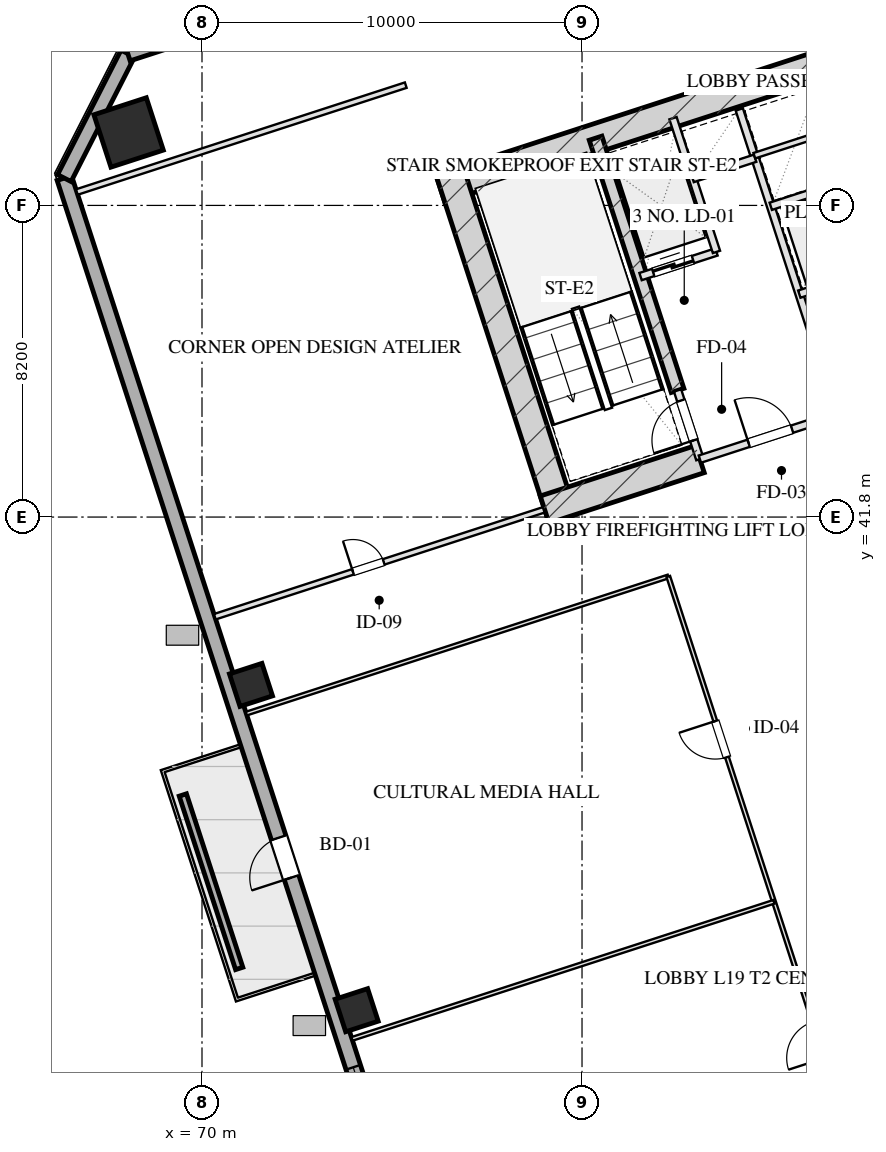
"""IFC4 building model, lengths in metres.
Left out: names, types, materials, properties, quantities, classifications, styles, units other than length and angle.
Written with IfcOpenShell. Run it as: python <this file> out.ifc"""

import sys

from ifc_helpers import new_model, si_unit, direction, frame, frame_2d, origin, origin_2d, place, context, subcontext, project, spatial, rectangle, hollow_rectangle, extrude, element, fill, save


model = new_model("IFC4")
c1 = context("Model", 3, precision=1e-05, world=origin(), true_north=direction((0.0, 1.0)))
c2 = subcontext(c1, "Body", "Model", "MODEL_VIEW")
j1 = project(units=[si_unit("LENGTHUNIT", "METRE"), si_unit("PLANEANGLEUNIT", "RADIAN")], contexts=[c1])
p1 = place(None, origin())
s1 = spatial("IfcSite", under=j1, at=p1, CompositionType="ELEMENT")
p2 = place(p1, origin())
s2 = spatial("IfcBuilding", under=s1, at=p2, CompositionType="ELEMENT")
p3 = place(p2, frame((0.0, 0.0, 78.2)))
s3 = spatial("IfcBuildingStorey", under=s2, at=p3, CompositionType="ELEMENT", Elevation=78.2)
p4 = place(p3, frame((76.272, 50.443, 0.0), z_axis=(0.0, 0.0, 1.0), x_axis=(0.951056072937, 0.309018358888, 0.0)))
e1 = element("IfcWall", 1, at=p4, inside=s3, PredefinedType="SHEAR", context=c2, shape_type="SweptSolid", body=[
    extrude(rectangle(XDim=16.55, YDim=0.75, at=frame_2d((8.275, 0.0))), origin(), (0.0, 0.0, 1.0), 3.45),
])
p5 = place(p3, frame((79.489, 41.756, 0.0), z_axis=(0.0, 0.0, 1.0), x_axis=(-0.309016134813, 0.951056795583, 0.0)))
e2 = element("IfcWall", 2, at=p5, inside=s3, PredefinedType="SHEAR", context=c2, shape_type="SweptSolid", body=[
    extrude(rectangle(XDim=9.63, YDim=0.75, at=frame_2d((4.815, 0.0))), origin(), (0.0, 0.0, 1.0), 3.45),
])
p6 = place(p3, frame((82.514, 45.131, 0.0), z_axis=(0.0, 0.0, 1.0), x_axis=(-0.308988790936, 0.951065679686, 0.0)))
e3 = element("IfcWall", 3, at=p6, inside=s3, PredefinedType="SHEAR", context=c2, shape_type="SweptSolid", body=[
    extrude(rectangle(XDim=6.98, YDim=0.35, at=frame_2d((3.49, 0.0))), origin(), (0.0, 0.0, 1.0), 3.45),
])
p7 = place(p3, frame((79.016, 41.997, 0.0), z_axis=(0.0, 0.0, 1.0), x_axis=(0.95106038264, 0.309005094736, 0.0)))
e4 = element("IfcWall", 4, at=p7, inside=s3, PredefinedType="SHEAR", context=c2, shape_type="SweptSolid", body=[
    extrude(rectangle(XDim=4.295, YDim=0.75, at=frame_2d((2.147, 0.0))), origin(), (0.0, 0.0, 1.0), 3.45),
])
p8 = place(p3, frame((68.069, 51.92, 0.0), z_axis=(0.0, 0.0, 1.0), x_axis=(0.951056516295, 0.309016994375, 0.0)))
e5 = element("IfcColumn", 5, at=p8, inside=s3, PredefinedType="COLUMN", context=c2, shape_type="SweptSolid", body=[
    extrude(hollow_rectangle(XDim=1.45, YDim=1.45, WallThickness=0.05, at=origin_2d()), origin(), (0.0, 0.0, 1.0), 3.451),
])
for number, where, z_axis, x_axis in (
    (6, (74.07, 28.824, 0.0), (0.0, 0.0, 1.0), (0.951, 0.309, 0.0)),
    (7, (71.289, 37.384, 0.0), (0.0, 0.0, 1.0), (0.951, 0.309, 0.0)),
):
    element("IfcColumn", number, at=place(p3, frame(where, z_axis=z_axis, x_axis=x_axis)), inside=s3, PredefinedType="COLUMN", context=c2, shape_type="SweptSolid", body=[
        extrude(hollow_rectangle(XDim=0.9, YDim=0.9, WallThickness=0.032, at=origin_2d()), origin(), (0.0, 0.0, 1.0), 3.451),
    ])
p9 = place(p3, frame((80.716, 6.59, 0.0), z_axis=(0.0, 0.0, 1.0), x_axis=(-0.309017542002, 0.95105633836, 0.0)))
e8 = element("IfcWall", 8, at=p9, inside=s3, PredefinedType="SOLIDWALL", context=c2, shape_type="SweptSolid", body=[
    extrude(rectangle(XDim=46.4, YDim=0.4, at=frame_2d((23.2, 0.0))), origin(), (0.0, 0.0, 1.0), 2.61),
])
p10 = place(p9, frame((15.6, 0.0, 0.75)))
e9 = element("IfcOpeningElement", 9, at=p10, cuts=e8, PredefinedType="OPENING", context=c2, shape_type="SweptSolid", body=[
    extrude(rectangle(XDim=2.4, YDim=1.46, at=frame_2d((1.2, 0.73))), frame((0.0, 0.21, 0.0), z_axis=(0.0, -1.0, 0.0), x_axis=(1.0, 0.0, 0.0)), (0.0, 0.0, 1.0), 0.42),
])
p11 = place(p9, frame((19.4, 0.0, 0.75)))
e10 = element("IfcOpeningElement", 10, at=p11, cuts=e8, PredefinedType="OPENING", context=c2, shape_type="SweptSolid", body=[
    extrude(rectangle(XDim=2.4, YDim=1.46, at=frame_2d((1.2, 0.73))), frame((0.0, 0.21, 0.0), z_axis=(0.0, -1.0, 0.0), x_axis=(1.0, 0.0, 0.0)), (0.0, 0.0, 1.0), 0.42),
])
p12 = place(p9, frame((27.05, 0.0, 0.0)))
e11 = element("IfcOpeningElement", 11, at=p12, cuts=e8, PredefinedType="OPENING", context=c2, shape_type="SweptSolid", body=[
    extrude(rectangle(XDim=1.1, YDim=2.15, at=frame_2d((0.55, 1.075))), frame((0.0, 0.21, 0.0), z_axis=(0.0, -1.0, 0.0), x_axis=(1.0, 0.0, 0.0)), (0.0, 0.0, 1.0), 0.42),
])
p13 = place(p3, frame((66.377, 50.719, 0.0), z_axis=(0.0, 0.0, 1.0), x_axis=(0.454026238093, 0.890988313685, 0.0)))
e12 = element("IfcWall", 12, at=p13, inside=s3, PredefinedType="SOLIDWALL", context=c2, shape_type="SweptSolid", body=[
    extrude(rectangle(XDim=3.677, YDim=0.4, at=frame_2d((1.838, 0.0))), origin(), (0.0, 0.0, 1.0), 2.61),
])
p14 = place(p3, frame((68.047, 53.995, 0.0), z_axis=(0.0, 0.0, 1.0), x_axis=(0.95105505922, 0.309021478754, 0.0)))
e13 = element("IfcWall", 13, at=p14, inside=s3, PredefinedType="SOLIDWALL", context=c2, shape_type="SweptSolid", body=[
    extrude(rectangle(XDim=29.4, YDim=0.4, at=frame_2d((14.7, 0.0))), origin(), (0.0, 0.0, 1.0), 2.61),
])
p15 = place(p3, frame((70.979, 29.923, 0.0), z_axis=(0.0, 0.0, 1.0), x_axis=(-0.308986014439, 0.951066581729, 0.0)))
e14 = element("IfcWall", 14, at=p15, inside=s3, PredefinedType="PARAPET", context=c2, shape_type="SweptSolid", body=[
    extrude(rectangle(XDim=4.8, YDim=0.2, at=frame_2d((2.4, 0.0))), origin(), (0.0, 0.0, 1.0), 0.75),
])
p16 = place(p3, frame((83.101, 43.324, 0.0), z_axis=(0.0, 0.0, 1.0), x_axis=(-0.309048298632, 0.951046344356, 0.0)))
e15 = element("IfcWall", 15, at=p16, inside=s3, PredefinedType="PARTITIONING", context=c2, shape_type="SweptSolid", body=[
    extrude(rectangle(XDim=1.9, YDim=0.2, at=frame_2d((0.95, 0.0))), origin(), (0.0, 0.0, 1.0), 3.175),
])
p17 = place(p16, frame((0.52, 0.0, 0.0)))
e16 = element("IfcOpeningElement", 16, at=p17, cuts=e15, PredefinedType="OPENING", context=c2, shape_type="SweptSolid", body=[
    extrude(rectangle(XDim=1.1, YDim=2.05, at=frame_2d((0.55, 1.025))), frame((0.0, 0.11, 0.0), z_axis=(0.0, -1.0, 0.0), x_axis=(1.0, 0.0, 0.0)), (0.0, 0.0, 1.0), 0.22),
])
p18 = place(p3, frame((86.743, 44.508, 0.0), z_axis=(0.0, 0.0, 1.0), x_axis=(-0.309016001439, 0.951056838919, 0.0)))
e17 = element("IfcWall", 17, at=p18, inside=s3, PredefinedType="PARTITIONING", context=c2, shape_type="SweptSolid", body=[
    extrude(rectangle(XDim=8.43, YDim=0.2, at=frame_2d((4.215, 0.0))), origin(), (0.0, 0.0, 1.0), 3.175),
])
p19 = place(p3, frame((83.101, 43.324, 0.0), z_axis=(0.0, 0.0, 1.0), x_axis=(0.951052804469, 0.309028417967, 0.0)))
e18 = element("IfcWall", 18, at=p19, inside=s3, PredefinedType="PARTITIONING", context=c2, shape_type="SweptSolid", body=[
    extrude(rectangle(XDim=3.83, YDim=0.2, at=frame_2d((1.915, 0.0))), origin(), (0.0, 0.0, 1.0), 3.175),
])
p20 = place(p19, frame((1.35, 0.0, 0.0)))
e19 = element("IfcOpeningElement", 19, at=p20, cuts=e18, PredefinedType="OPENING", context=c2, shape_type="SweptSolid", body=[
    extrude(rectangle(XDim=1.2, YDim=2.05, at=frame_2d((0.6, 1.025))), frame((0.0, 0.11, 0.0), z_axis=(0.0, -1.0, 0.0), x_axis=(1.0, 0.0, 0.0)), (0.0, 0.0, 1.0), 0.22),
])
p21 = place(p3, frame((81.54, 48.127, 0.0), z_axis=(0.0, 0.0, 1.0), x_axis=(0.951062257173, 0.308999325213, 0.0)))
e20 = element("IfcWall", 20, at=p21, inside=s3, PredefinedType="PARTITIONING", context=c2, shape_type="SweptSolid", body=[
    extrude(rectangle(XDim=2.1, YDim=0.2, at=frame_2d((1.05, 0.0))), origin(), (0.0, 0.0, 1.0), 3.175),
])
p22 = place(p21, frame((0.35, 0.0, 0.0)))
e21 = element("IfcOpeningElement", 21, at=p22, cuts=e20, PredefinedType="OPENING", context=c2, shape_type="SweptSolid", body=[
    extrude(rectangle(XDim=1.1, YDim=2.05, at=frame_2d((0.55, 1.025))), frame((0.0, 0.11, 0.0), z_axis=(0.0, -1.0, 0.0), x_axis=(1.0, 0.0, 0.0)), (0.0, 0.0, 1.0), 0.22),
])
p23 = place(p3, frame((83.538, 48.776, 0.0), z_axis=(0.0, 0.0, 1.0), x_axis=(-0.3089935693, 0.951064127245, 0.0)))
e22 = element("IfcWall", 22, at=p23, inside=s3, PredefinedType="PARTITIONING", context=c2, shape_type="SweptSolid", body=[
    extrude(rectangle(XDim=3.7, YDim=0.2, at=frame_2d((1.85, 0.0))), origin(), (0.0, 0.0, 1.0), 3.175),
])
p24 = place(p3, frame((82.91, 50.707, 0.0), z_axis=(0.0, 0.0, 1.0), x_axis=(0.951041328149, 0.309063734775, 0.0)))
e23 = element("IfcWall", 23, at=p24, inside=s3, PredefinedType="PARTITIONING", context=c2, shape_type="SweptSolid", body=[
    extrude(rectangle(XDim=1.73, YDim=0.2, at=frame_2d((0.865, 0.0))), origin(), (0.0, 0.0, 1.0), 3.175),
])
p25 = place(p3, frame((85.718, 47.666, 0.0), z_axis=(0.0, 0.0, 1.0), x_axis=(0.951058531764, 0.30901079133, 0.0)))
e24 = element("IfcWall", 24, at=p25, inside=s3, PredefinedType="PARTITIONING", context=c2, shape_type="SweptSolid", body=[
    extrude(rectangle(XDim=4.4, YDim=0.2, at=frame_2d((2.2, 0.0))), origin(), (0.0, 0.0, 1.0), 3.175),
])
p26 = place(p25, frame((0.45, 0.0, 0.0)))
e25 = element("IfcOpeningElement", 25, at=p26, cuts=e24, PredefinedType="OPENING", context=c2, shape_type="SweptSolid", body=[
    extrude(rectangle(XDim=1.1, YDim=2.05, at=frame_2d((0.55, 1.025))), frame((0.0, 0.11, 0.0), z_axis=(0.0, -1.0, 0.0), x_axis=(1.0, 0.0, 0.0)), (0.0, 0.0, 1.0), 0.22),
])
p27 = place(p25, frame((2.55, 0.0, 0.0)))
e26 = element("IfcOpeningElement", 26, at=p27, cuts=e24, PredefinedType="OPENING", context=c2, shape_type="SweptSolid", body=[
    extrude(rectangle(XDim=1.1, YDim=2.05, at=frame_2d((0.55, 1.025))), frame((0.0, 0.11, 0.0), z_axis=(0.0, -1.0, 0.0), x_axis=(1.0, 0.0, 0.0)), (0.0, 0.0, 1.0), 0.22),
])
p28 = place(p3, frame((84.967, 49.977, 0.0), z_axis=(0.0, 0.0, 1.0), x_axis=(0.951063829732, 0.308994485023, 0.0)))
e27 = element("IfcWall", 27, at=p28, inside=s3, PredefinedType="PARTITIONING", context=c2, shape_type="SweptSolid", body=[
    extrude(rectangle(XDim=4.4, YDim=0.2, at=frame_2d((2.2, 0.0))), origin(), (0.0, 0.0, 1.0), 3.175),
])
p29 = place(p3, frame((84.534, 51.308, 0.0), z_axis=(0.0, 0.0, 1.0), x_axis=(0.951075093106, 0.308959814982, 0.0)))
e28 = element("IfcWall", 28, at=p29, inside=s3, PredefinedType="PARTITIONING", context=c2, shape_type="SweptSolid", body=[
    extrude(rectangle(XDim=2.23, YDim=0.15, at=frame_2d((1.115, 0.0))), origin(), (0.0, 0.0, 1.0), 3.175),
])
p30 = place(p3, frame((66.707, 50.352, 0.0), z_axis=(0.0, 0.0, 1.0), x_axis=(0.951057133767, 0.309015093986, 0.0)))
e29 = element("IfcWall", 29, at=p30, inside=s3, PredefinedType="PARTITIONING", context=c2, shape_type="SweptSolid", body=[
    extrude(rectangle(XDim=9.1, YDim=0.15, at=frame_2d((4.55, 0.0))), origin(), (0.0, 0.0, 1.0), 3.175),
])
p31 = place(p3, frame((70.338, 39.177, 0.0), z_axis=(0.0, 0.0, 1.0), x_axis=(0.951059695568, 0.309007209409, 0.0)))
e30 = element("IfcWall", 30, at=p31, inside=s3, PredefinedType="PARTITIONING", context=c2, shape_type="SweptSolid", body=[
    extrude(rectangle(XDim=9.1, YDim=0.15, at=frame_2d((4.55, 0.0))), origin(), (0.0, 0.0, 1.0), 3.175),
])
p32 = place(p31, frame((3.822, 0.0, 0.0)))
e31 = element("IfcOpeningElement", 31, at=p32, cuts=e30, PredefinedType="OPENING", context=c2, shape_type="SweptSolid", body=[
    extrude(rectangle(XDim=0.85, YDim=2.05, at=frame_2d((0.425, 1.025))), frame((0.0, 0.085, 0.0), z_axis=(0.0, -1.0, 0.0), x_axis=(1.0, 0.0, 0.0)), (0.0, 0.0, 1.0), 0.17),
])
p33 = place(p3, frame((71.166, 36.629, 0.0), z_axis=(0.0, 0.0, 1.0), x_axis=(0.951058653673, 0.309010416124, 0.0)))
e32 = element("IfcWall", 32, at=p33, inside=s3, PredefinedType="MOVABLE", context=c2, shape_type="SweptSolid", body=[
    extrude(rectangle(XDim=11.675, YDim=0.1, at=frame_2d((5.837, 0.0))), origin(), (0.0, 0.0, 1.0), 3.175),
])
p34 = place(p3, frame((87.412, 24.411, 0.0), z_axis=(0.0, 0.0, 1.0), x_axis=(-0.309022042254, 0.951054876125, 0.0)))
e33 = element("IfcWall", 33, at=p34, inside=s3, PredefinedType="MOVABLE", context=c2, shape_type="SweptSolid", body=[
    extrude(rectangle(XDim=16.64, YDim=0.1, at=frame_2d((8.32, 0.0))), origin(), (0.0, 0.0, 1.0), 3.175),
])
p35 = place(p34, frame((3.32, 0.0, 0.0)))
e34 = element("IfcOpeningElement", 34, at=p35, cuts=e33, PredefinedType="OPENING", context=c2, shape_type="SweptSolid", body=[
    extrude(rectangle(XDim=1.0, YDim=2.05, at=frame_2d((0.5, 1.025))), frame((0.0, 0.06, 0.0), z_axis=(0.0, -1.0, 0.0), x_axis=(1.0, 0.0, 0.0)), (0.0, 0.0, 1.0), 0.12),
])
p36 = place(p34, frame((11.64, 0.0, 0.0)))
e35 = element("IfcOpeningElement", 35, at=p36, cuts=e33, PredefinedType="OPENING", context=c2, shape_type="SweptSolid", body=[
    extrude(rectangle(XDim=1.0, YDim=2.05, at=frame_2d((0.5, 1.025))), frame((0.0, 0.06, 0.0), z_axis=(0.0, -1.0, 0.0), x_axis=(1.0, 0.0, 0.0)), (0.0, 0.0, 1.0), 0.12),
])
p37 = place(p3, frame((73.947, 28.069, 0.0), z_axis=(0.0, 0.0, 1.0), x_axis=(0.951058653673, 0.309010416124, 0.0)))
e36 = element("IfcWall", 36, at=p37, inside=s3, PredefinedType="MOVABLE", context=c2, shape_type="SweptSolid", body=[
    extrude(rectangle(XDim=11.675, YDim=0.1, at=frame_2d((5.837, 0.0))), origin(), (0.0, 0.0, 1.0), 3.175),
])
p38 = place(p11, origin())
e37 = element("IfcWindow", 37, at=p38, inside=s3, PartitioningType="TRIPLE_PANEL_VERTICAL", PredefinedType="WINDOW", context=c2, shape_type="SweptSolid", body=[
    extrude(rectangle(XDim=2.4, YDim=1.46, at=frame_2d((1.2, 0.73))), frame((0.0, 0.03, 0.0), z_axis=(0.0, -1.0, 0.0), x_axis=(1.0, 0.0, 0.0)), (0.0, 0.0, 1.0), 0.06),
])
fill(e10, e37)
p39 = place(p12, origin())
e38 = element("IfcDoor", 38, at=p39, inside=s3, OperationType="SINGLE_SWING_LEFT", PredefinedType="DOOR", context=c2, shape_type="SweptSolid", body=[
    extrude(rectangle(XDim=1.1, YDim=2.15, at=frame_2d((0.55, 1.075))), frame((0.0, 0.025, 0.0), z_axis=(0.0, -1.0, 0.0), x_axis=(1.0, 0.0, 0.0)), (0.0, 0.0, 1.0), 0.05),
])
fill(e11, e38)
p40 = place(p17, origin())
e39 = element("IfcDoor", 39, at=p40, inside=s3, OperationType="SINGLE_SWING_LEFT", PredefinedType="DOOR", context=c2, shape_type="SweptSolid", body=[
    extrude(rectangle(XDim=1.1, YDim=2.05, at=frame_2d((0.55, 1.025))), frame((0.0, 0.025, 0.0), z_axis=(0.0, -1.0, 0.0), x_axis=(1.0, 0.0, 0.0)), (0.0, 0.0, 1.0), 0.05),
])
fill(e16, e39)
p41 = place(p20, origin())
e40 = element("IfcDoor", 40, at=p41, inside=s3, OperationType="SINGLE_SWING_LEFT", PredefinedType="DOOR", context=c2, shape_type="SweptSolid", body=[
    extrude(rectangle(XDim=1.2, YDim=2.05, at=frame_2d((0.6, 1.025))), frame((0.0, 0.025, 0.0), z_axis=(0.0, -1.0, 0.0), x_axis=(1.0, 0.0, 0.0)), (0.0, 0.0, 1.0), 0.05),
])
fill(e19, e40)
p42 = place(p22, origin())
e41 = element("IfcDoor", 41, at=p42, inside=s3, OperationType="DOUBLE_DOOR_SLIDING", PredefinedType="DOOR", context=c2, shape_type="SweptSolid", body=[
    extrude(rectangle(XDim=1.1, YDim=2.05, at=frame_2d((0.55, 1.025))), frame((0.0, 0.025, 0.0), z_axis=(0.0, -1.0, 0.0), x_axis=(1.0, 0.0, 0.0)), (0.0, 0.0, 1.0), 0.05),
])
fill(e21, e41)
p43 = place(p32, origin())
e42 = element("IfcDoor", 42, at=p43, inside=s3, OperationType="SINGLE_SWING_LEFT", PredefinedType="DOOR", context=c2, shape_type="SweptSolid", body=[
    extrude(rectangle(XDim=0.85, YDim=2.05, at=frame_2d((0.425, 1.025))), frame((0.0, 0.025, 0.0), z_axis=(0.0, -1.0, 0.0), x_axis=(1.0, 0.0, 0.0)), (0.0, 0.0, 1.0), 0.05),
])
fill(e31, e42)
p44 = place(p36, origin())
e43 = element("IfcDoor", 43, at=p44, inside=s3, OperationType="SINGLE_SWING_RIGHT", PredefinedType="DOOR", context=c2, shape_type="SweptSolid", body=[
    extrude(rectangle(XDim=1.0, YDim=2.05, at=frame_2d((0.5, 1.025))), frame((0.0, 0.025, 0.0), z_axis=(0.0, -1.0, 0.0), x_axis=(1.0, 0.0, 0.0)), (0.0, 0.0, 1.0), 0.05),
])
fill(e35, e43)
save(model, sys.argv[1])
